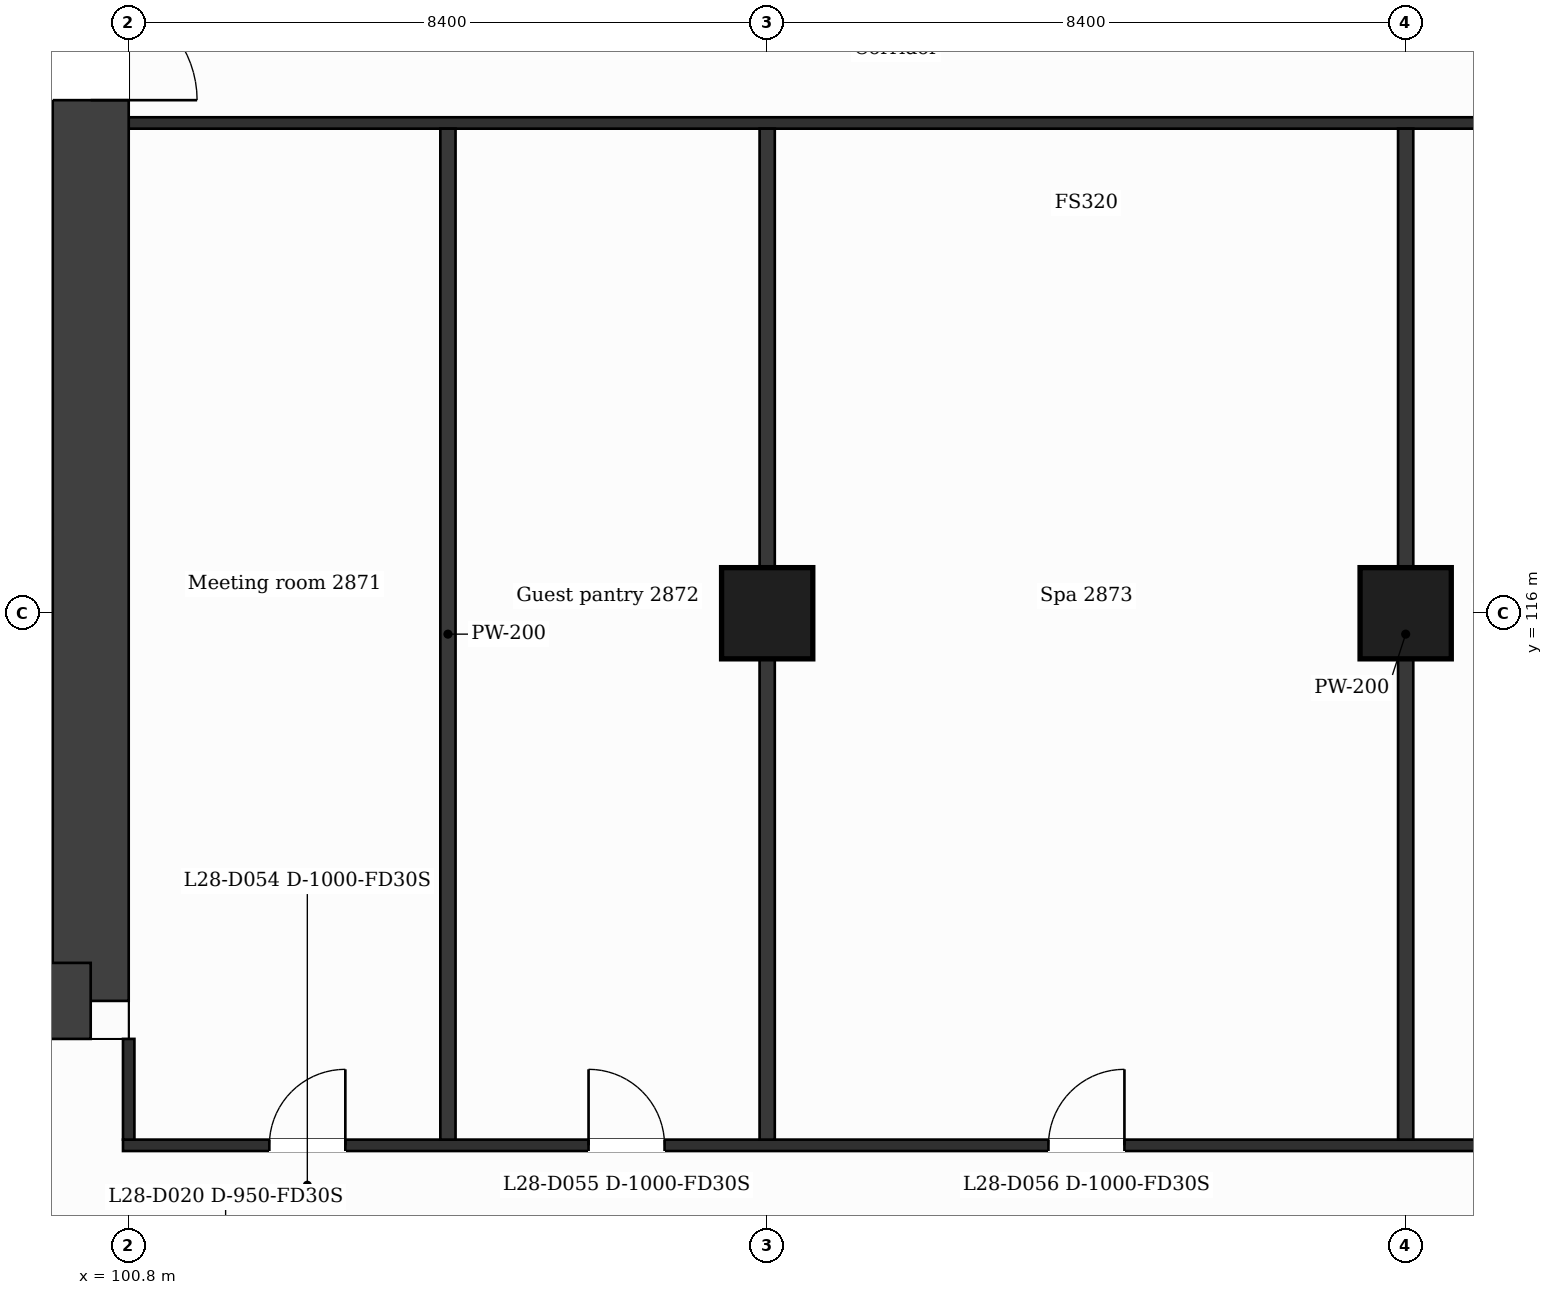
"""IFC4 building model, lengths in metres.
Left out: names, types, materials, properties, quantities, classifications, styles, units other than length and angle.
Written with IfcOpenShell. Run it as: python <this file> out.ifc"""

import sys

from ifc_helpers import new_model, si_unit, direction, frame, frame_2d, origin, origin_2d, place, context, subcontext, project, spatial, rectangle, extrude, element, fill, save


model = new_model("IFC4")
c1 = context("Model", 3, precision=1e-05, world=origin(), true_north=direction((0.0, 1.0)))
c2 = subcontext(c1, "Body", "Model", "MODEL_VIEW")
j1 = project(units=[si_unit("LENGTHUNIT", "METRE"), si_unit("PLANEANGLEUNIT", "RADIAN")], contexts=[c1])
p1 = place(None, origin())
s1 = spatial("IfcSite", under=j1, at=p1, CompositionType="ELEMENT")
p2 = place(p1, origin())
s2 = spatial("IfcBuilding", under=s1, at=p2, CompositionType="ELEMENT")
p3 = place(p2, frame((0.0, 0.0, 120.6)))
s3 = spatial("IfcBuildingStorey", under=s2, at=p3, CompositionType="ELEMENT", Elevation=120.6)
p4 = place(p3, frame((100.3, 131.9, 0.0), z_axis=(0.0, 0.0, 1.0), x_axis=(0.0, -1.0, 0.0)))
e1 = element("IfcWall", 1, at=p4, inside=s3, PredefinedType="SHEAR", context=c2, shape_type="SweptSolid", body=[
    extrude(rectangle(XDim=21.0, YDim=1.0, at=frame_2d((10.5, 0.0))), origin(), (0.0, 0.0, 1.0), 3.7),
])
p5 = place(p4, frame((7.75, 0.0, 0.0)))
e2 = element("IfcOpeningElement", 2, at=p5, cuts=e1, PredefinedType="OPENING", context=c2, shape_type="SweptSolid", body=[
    extrude(rectangle(XDim=1.4, YDim=2.1, at=frame_2d((0.7, 1.05))), frame((0.0, 0.51, 0.0), z_axis=(0.0, -1.0, 0.0), x_axis=(1.0, 0.0, 0.0)), (0.0, 0.0, 1.0), 1.02),
])
p6 = place(p3, frame((100.3, 110.9, 0.0), z_axis=(0.0, 0.0, 1.0), x_axis=(-1.0, 0.0, 0.0)))
e3 = element("IfcWall", 3, at=p6, inside=s3, PredefinedType="SHEAR", context=c2, shape_type="SweptSolid", body=[
    extrude(rectangle(XDim=14.059, YDim=1.0, at=frame_2d((7.03, 0.0))), origin(), (0.0, 0.0, 1.0), 3.7),
])
p7 = place(p6, frame((5.802, 0.0, 0.0)))
e4 = element("IfcOpeningElement", 4, at=p7, cuts=e3, PredefinedType="OPENING", context=c2, shape_type="SweptSolid", body=[
    extrude(rectangle(XDim=1.4, YDim=2.1, at=frame_2d((0.7, 1.05))), frame((0.0, 0.51, 0.0), z_axis=(0.0, -1.0, 0.0), x_axis=(1.0, 0.0, 0.0)), (0.0, 0.0, 1.0), 1.02),
])
p8 = place(p3, frame((94.9, 116.5, 0.0), z_axis=(0.0, 0.0, 1.0), x_axis=(1.0, 0.0, 0.0)))
e5 = element("IfcWall", 5, at=p8, inside=s3, PredefinedType="SHEAR", context=c2, shape_type="SweptSolid", body=[
    extrude(rectangle(XDim=4.9, YDim=1.0, at=frame_2d((2.45, 0.0))), origin(), (0.0, 0.0, 1.0), 3.7),
])
for number, where, z_axis, x_axis in (
    (6, (109.2, 116.0, 0.0), (0.0, 0.0, 1.0), (1.0, 0.0, 0.0)),
    (7, (117.6, 116.0, 0.0), (0.0, 0.0, 1.0), (1.0, 0.0, 0.0)),
):
    element("IfcColumn", number, at=place(p3, frame(where, z_axis=z_axis, x_axis=x_axis)), inside=s3, PredefinedType="COLUMN", context=c2, shape_type="SweptSolid", body=[
        extrude(rectangle(XDim=1.2, YDim=1.2, at=origin_2d()), origin(), (0.0, 0.0, 1.0), 3.7),
    ])
p9 = place(p3, frame((100.725, 109.0, 0.0), z_axis=(0.0, 0.0, 1.0), x_axis=(1.0, 0.0, 0.0)))
e8 = element("IfcWall", 8, at=p9, inside=s3, PredefinedType="PARTITIONING", context=c2, shape_type="SweptSolid", body=[
    extrude(rectangle(XDim=25.35, YDim=0.15, at=frame_2d((12.675, 0.0))), origin(), (0.0, 0.0, 1.0), 3.38),
])
p10 = place(p9, frame((1.925, 0.0, 0.0)))
e9 = element("IfcOpeningElement", 9, at=p10, cuts=e8, PredefinedType="OPENING", context=c2, shape_type="SweptSolid", body=[
    extrude(rectangle(XDim=1.0, YDim=2.1, at=frame_2d((0.5, 1.05))), frame((0.0, 0.085, 0.0), z_axis=(0.0, -1.0, 0.0), x_axis=(1.0, 0.0, 0.0)), (0.0, 0.0, 1.0), 0.17),
])
p11 = place(p9, frame((6.125, 0.0, 0.0)))
e10 = element("IfcOpeningElement", 10, at=p11, cuts=e8, PredefinedType="OPENING", context=c2, shape_type="SweptSolid", body=[
    extrude(rectangle(XDim=1.0, YDim=2.1, at=frame_2d((0.5, 1.05))), frame((0.0, 0.085, 0.0), z_axis=(0.0, -1.0, 0.0), x_axis=(1.0, 0.0, 0.0)), (0.0, 0.0, 1.0), 0.17),
])
p12 = place(p9, frame((12.175, 0.0, 0.0)))
e11 = element("IfcOpeningElement", 11, at=p12, cuts=e8, PredefinedType="OPENING", context=c2, shape_type="SweptSolid", body=[
    extrude(rectangle(XDim=1.0, YDim=2.1, at=frame_2d((0.5, 1.05))), frame((0.0, 0.085, 0.0), z_axis=(0.0, -1.0, 0.0), x_axis=(1.0, 0.0, 0.0)), (0.0, 0.0, 1.0), 0.17),
])
p13 = place(p9, frame((19.1, 0.0, 0.0)))
e12 = element("IfcOpeningElement", 12, at=p13, cuts=e8, PredefinedType="OPENING", context=c2, shape_type="SweptSolid", body=[
    extrude(rectangle(XDim=1.0, YDim=2.1, at=frame_2d((0.5, 1.05))), frame((0.0, 0.085, 0.0), z_axis=(0.0, -1.0, 0.0), x_axis=(1.0, 0.0, 0.0)), (0.0, 0.0, 1.0), 0.17),
])
p14 = place(p9, frame((22.05, 0.0, 0.0)))
e13 = element("IfcOpeningElement", 13, at=p14, cuts=e8, PredefinedType="OPENING", context=c2, shape_type="SweptSolid", body=[
    extrude(rectangle(XDim=1.0, YDim=2.1, at=frame_2d((0.5, 1.05))), frame((0.0, 0.085, 0.0), z_axis=(0.0, -1.0, 0.0), x_axis=(1.0, 0.0, 0.0)), (0.0, 0.0, 1.0), 0.17),
])
for number, where, z_axis, x_axis in (
    (14, (95.227, 117.2, 0.0), (0.0, 0.0, 1.0), (1.0, 0.0, 0.0)),
    (15, (95.227, 118.8, 0.0), (0.0, 0.0, 1.0), (1.0, 0.0, 0.0)),
):
    element("IfcWall", number, at=place(p3, frame(where, z_axis=z_axis, x_axis=x_axis)), inside=s3, PredefinedType="PARTITIONING", context=c2, shape_type="SweptSolid", body=[
        extrude(rectangle(XDim=4.573, YDim=0.2, at=frame_2d((2.287, 0.0))), origin(), (0.0, 0.0, 1.0), 3.38),
    ])
p15 = place(p3, frame((95.227, 122.1, 0.0), z_axis=(0.0, 0.0, 1.0), x_axis=(1.0, 0.0, 0.0)))
e16 = element("IfcWall", 16, at=p15, inside=s3, PredefinedType="PARTITIONING", context=c2, shape_type="SweptSolid", body=[
    extrude(rectangle(XDim=4.573, YDim=0.2, at=frame_2d((2.287, 0.0))), origin(), (0.0, 0.0, 1.0), 3.38),
])
p16 = place(p15, frame((2.134, 0.0, 0.0)))
e17 = element("IfcOpeningElement", 17, at=p16, cuts=e16, PredefinedType="OPENING", context=c2, shape_type="SweptSolid", body=[
    extrude(rectangle(XDim=0.9, YDim=2.1, at=frame_2d((0.45, 1.05))), frame((0.0, 0.11, 0.0), z_axis=(0.0, -1.0, 0.0), x_axis=(1.0, 0.0, 0.0)), (0.0, 0.0, 1.0), 0.22),
])
p17 = place(p3, frame((100.8, 122.45, 0.0), z_axis=(0.0, 0.0, 1.0), x_axis=(1.0, 0.0, 0.0)))
e18 = element("IfcWall", 18, at=p17, inside=s3, PredefinedType="PARTITIONING", context=c2, shape_type="SweptSolid", body=[
    extrude(rectangle(XDim=25.2, YDim=0.15, at=frame_2d((12.6, 0.0))), origin(), (0.0, 0.0, 1.0), 3.38),
])
p18 = place(p3, frame((100.8, 109.075, 0.0), z_axis=(0.0, 0.0, 1.0), x_axis=(0.0, 1.0, 0.0)))
e19 = element("IfcWall", 19, at=p18, inside=s3, PredefinedType="PARTITIONING", context=c2, shape_type="SweptSolid", body=[
    extrude(rectangle(XDim=1.325, YDim=0.15, at=frame_2d((0.663, 0.0))), origin(), (0.0, 0.0, 1.0), 3.38),
])
for number, where, z_axis, x_axis in (
    (20, (105.0, 109.075, 0.0), (0.0, 0.0, 1.0), (0.0, 1.0, 0.0)),
    (21, (109.2, 109.075, 0.0), (0.0, 0.0, 1.0), (0.0, 1.0, 0.0)),
    (22, (117.6, 109.075, 0.0), (0.0, 0.0, 1.0), (0.0, 1.0, 0.0)),
):
    element("IfcWall", number, at=place(p3, frame(where, z_axis=z_axis, x_axis=x_axis)), inside=s3, PredefinedType="PARTITIONING", context=c2, shape_type="SweptSolid", body=[
        extrude(rectangle(XDim=13.3, YDim=0.2, at=frame_2d((6.65, 0.0))), origin(), (0.0, 0.0, 1.0), 3.38),
    ])
p19 = place(p10, origin())
e23 = element("IfcDoor", 23, at=p19, inside=s3, OperationType="SINGLE_SWING_RIGHT", PredefinedType="DOOR", context=c2, shape_type="SweptSolid", body=[
    extrude(rectangle(XDim=1.0, YDim=2.1, at=frame_2d((0.5, 1.05))), frame((0.0, 0.025, 0.0), z_axis=(0.0, -1.0, 0.0), x_axis=(1.0, 0.0, 0.0)), (0.0, 0.0, 1.0), 0.05),
])
fill(e9, e23)
p20 = place(p11, origin())
e24 = element("IfcDoor", 24, at=p20, inside=s3, OperationType="SINGLE_SWING_LEFT", PredefinedType="DOOR", context=c2, shape_type="SweptSolid", body=[
    extrude(rectangle(XDim=1.0, YDim=2.1, at=frame_2d((0.5, 1.05))), frame((0.0, 0.025, 0.0), z_axis=(0.0, -1.0, 0.0), x_axis=(1.0, 0.0, 0.0)), (0.0, 0.0, 1.0), 0.05),
])
fill(e10, e24)
p21 = place(p12, origin())
e25 = element("IfcDoor", 25, at=p21, inside=s3, OperationType="SINGLE_SWING_RIGHT", PredefinedType="DOOR", context=c2, shape_type="SweptSolid", body=[
    extrude(rectangle(XDim=1.0, YDim=2.1, at=frame_2d((0.5, 1.05))), frame((0.0, 0.025, 0.0), z_axis=(0.0, -1.0, 0.0), x_axis=(1.0, 0.0, 0.0)), (0.0, 0.0, 1.0), 0.05),
])
fill(e11, e25)
p22 = place(p5, origin())
e26 = element("IfcDoor", 26, at=p22, inside=s3, OperationType="SINGLE_SWING_RIGHT", PredefinedType="DOOR", context=c2, shape_type="SweptSolid", body=[
    extrude(rectangle(XDim=1.4, YDim=2.1, at=frame_2d((0.7, 1.05))), frame((0.0, 0.025, 0.0), z_axis=(0.0, -1.0, 0.0), x_axis=(1.0, 0.0, 0.0)), (0.0, 0.0, 1.0), 0.05),
])
fill(e2, e26)
save(model, sys.argv[1])
